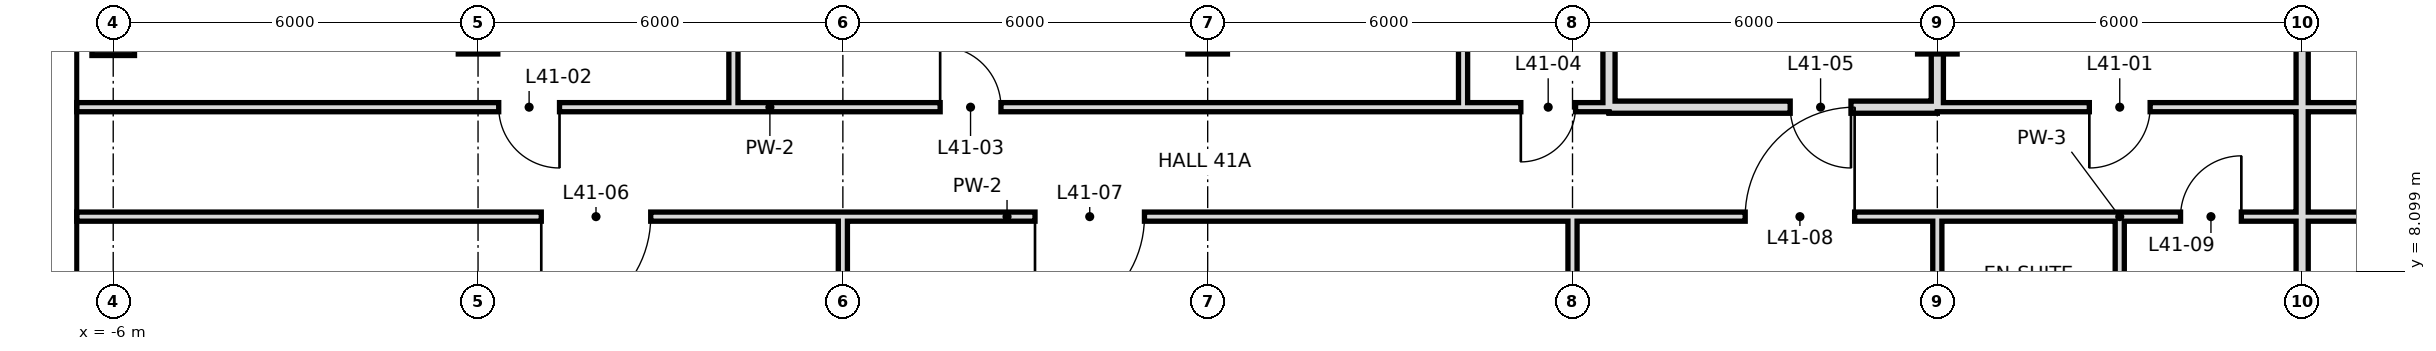
"""IFC4 building model, lengths in metres.
Left out: names, types, materials, properties, quantities, classifications, styles, units other than length and angle.
Written with IfcOpenShell. Run it as: python <this file> out.ifc"""

import sys

from ifc_helpers import new_model, si_unit, direction, frame, frame_2d, origin, origin_2d, place, context, subcontext, project, spatial, rectangle, hollow_rectangle, extrude, element, fill, save


model = new_model("IFC4")
c1 = context("Model", 3, precision=1e-05, world=origin(), true_north=direction((0.0, 1.0)))
c2 = subcontext(c1, "Body", "Model", "MODEL_VIEW")
j1 = project(units=[si_unit("LENGTHUNIT", "METRE"), si_unit("PLANEANGLEUNIT", "RADIAN")], contexts=[c1])
p1 = place(None, origin())
s1 = spatial("IfcSite", under=j1, at=p1, CompositionType="ELEMENT")
p2 = place(p1, origin())
s2 = spatial("IfcBuilding", under=s1, at=p2, CompositionType="ELEMENT")
p3 = place(p2, frame((0.0, 0.0, 178.0)))
s3 = spatial("IfcBuildingStorey", under=s2, at=p3, CompositionType="ELEMENT", Elevation=178.0)
p4 = place(p3, frame((-6.0, 12.0, 0.0), z_axis=(0.0, 0.0, 1.0), x_axis=(1.0, 0.0, 0.0)))
e1 = element("IfcColumn", 1, at=p4, inside=s3, PredefinedType="COLUMN", context=c2, shape_type="SweptSolid", body=[
    extrude(hollow_rectangle(XDim=0.7, YDim=0.7, WallThickness=0.036, at=origin_2d()), origin(), (0.0, 0.0, 1.0), 3.6),
])
for number, where, z_axis, x_axis in (
    (2, (0.0, 12.0, 0.0), (0.0, 0.0, 1.0), (1.0, 0.0, 0.0)),
    (3, (12.0, 12.0, 0.0), (0.0, 0.0, 1.0), (1.0, 0.0, 0.0)),
    (4, (24.0, 12.0, 0.0), (0.0, 0.0, 1.0), (1.0, 0.0, 0.0)),
):
    element("IfcColumn", number, at=place(p3, frame(where, z_axis=z_axis, x_axis=x_axis)), inside=s3, PredefinedType="COLUMN", context=c2, shape_type="SweptSolid", body=[
        extrude(hollow_rectangle(XDim=0.65, YDim=0.65, WallThickness=0.032, at=origin_2d()), origin(), (0.0, 0.0, 1.0), 3.6),
    ])
p5 = place(p3, frame((16.2, 10.8, 0.0), z_axis=(0.0, 0.0, 1.0), x_axis=(0.0, 1.0, 0.0)))
e5 = element("IfcWall", 5, at=p5, inside=s3, PredefinedType="PARTITIONING", context=c2, shape_type="SweptSolid", body=[
    extrude(rectangle(XDim=4.5, YDim=0.15, at=frame_2d((2.25, 0.0))), origin(), (0.0, 0.0, 1.0), 3.42),
])
p6 = place(p3, frame((18.0, -0.6, 0.0), z_axis=(0.0, 0.0, 1.0), x_axis=(0.0, 1.0, 0.0)))
e6 = element("IfcWall", 6, at=p6, inside=s3, PredefinedType="PARTITIONING", context=c2, shape_type="SweptSolid", body=[
    extrude(rectangle(XDim=9.6, YDim=0.15, at=frame_2d((4.8, 0.0))), origin(), (0.0, 0.0, 1.0), 2.72),
])
for number, where, z_axis, x_axis in (
    (7, (18.6, 10.8, 0.0), (0.0, 0.0, 1.0), (0.0, 1.0, 0.0)),
    (8, (24.0, 10.8, 0.0), (0.0, 0.0, 1.0), (0.0, 1.0, 0.0)),
):
    element("IfcWall", number, at=place(p3, frame(where, z_axis=z_axis, x_axis=x_axis)), inside=s3, PredefinedType="SOLIDWALL", context=c2, shape_type="SweptSolid", body=[
        extrude(rectangle(XDim=4.5, YDim=0.2, at=frame_2d((2.25, 0.0))), origin(), (0.0, 0.0, 1.0), 2.72),
    ])
p7 = place(p3, frame((24.0, 6.0, 0.0), z_axis=(0.0, 0.0, 1.0), x_axis=(0.0, 1.0, 0.0)))
e9 = element("IfcWall", 9, at=p7, inside=s3, PredefinedType="PARTITIONING", context=c2, shape_type="SweptSolid", body=[
    extrude(rectangle(XDim=3.0, YDim=0.15, at=frame_2d((1.5, 0.0))), origin(), (0.0, 0.0, 1.0), 2.72),
])
p8 = place(p3, frame((27.0, 6.0, 0.0), z_axis=(0.0, 0.0, 1.0), x_axis=(0.0, 1.0, 0.0)))
e10 = element("IfcWall", 10, at=p8, inside=s3, PredefinedType="PARTITIONING", context=c2, shape_type="SweptSolid", body=[
    extrude(rectangle(XDim=3.0, YDim=0.15, at=frame_2d((1.5, 0.0))), origin(), (0.0, 0.0, 1.0), 3.42),
])
p9 = place(p3, frame((30.0, -0.6, 0.0), z_axis=(0.0, 0.0, 1.0), x_axis=(0.0, 1.0, 0.0)))
e11 = element("IfcWall", 11, at=p9, inside=s3, PredefinedType="SOLIDWALL", context=c2, shape_type="SweptSolid", body=[
    extrude(rectangle(XDim=15.9, YDim=0.2, at=frame_2d((7.95, 0.0))), origin(), (0.0, 0.0, 1.0), 2.72),
])
p10 = place(p3, frame((4.2, 10.8, 0.0), z_axis=(0.0, 0.0, 1.0), x_axis=(0.0, 1.0, 0.0)))
e12 = element("IfcWall", 12, at=p10, inside=s3, PredefinedType="PARTITIONING", context=c2, shape_type="SweptSolid", body=[
    extrude(rectangle(XDim=4.5, YDim=0.15, at=frame_2d((2.25, 0.0))), origin(), (0.0, 0.0, 1.0), 3.42),
])
p11 = place(p3, frame((6.0, -0.6, 0.0), z_axis=(0.0, 0.0, 1.0), x_axis=(0.0, 1.0, 0.0)))
e13 = element("IfcWall", 13, at=p11, inside=s3, PredefinedType="PARTITIONING", context=c2, shape_type="SweptSolid", body=[
    extrude(rectangle(XDim=9.6, YDim=0.15, at=frame_2d((4.8, 0.0))), origin(), (0.0, 0.0, 1.0), 2.72),
])
p12 = place(p3, frame((18.6, 10.8, 0.0), z_axis=(0.0, 0.0, 1.0), x_axis=(1.0, 0.0, 0.0)))
e14 = element("IfcWall", 14, at=p12, inside=s3, PredefinedType="SOLIDWALL", context=c2, shape_type="SweptSolid", body=[
    extrude(rectangle(XDim=5.4, YDim=0.2, at=frame_2d((2.7, 0.0))), origin(), (0.0, 0.0, 1.0), 2.72),
])
p13 = place(p12, frame((2.98, 0.0, 0.0)))
e15 = element("IfcOpeningElement", 15, at=p13, cuts=e14, PredefinedType="OPENING", context=c2, shape_type="SweptSolid", body=[
    extrude(rectangle(XDim=1.0, YDim=2.4, at=frame_2d((0.5, 1.2))), frame((0.0, 0.11, 0.0), z_axis=(0.0, -1.0, 0.0), x_axis=(1.0, 0.0, 0.0)), (0.0, 0.0, 1.0), 0.22),
])
p14 = place(p3, frame((-6.6, 10.8, 0.0), z_axis=(0.0, 0.0, 1.0), x_axis=(1.0, 0.0, 0.0)))
e16 = element("IfcWall", 16, at=p14, inside=s3, PredefinedType="PARTITIONING", context=c2, shape_type="SweptSolid", body=[
    extrude(rectangle(XDim=22.8, YDim=0.15, at=frame_2d((11.4, 0.0))), origin(), (0.0, 0.0, 1.0), 3.42),
])
p15 = place(p14, frame((6.94, 0.0, 0.0)))
e17 = element("IfcOpeningElement", 17, at=p15, cuts=e16, PredefinedType="OPENING", context=c2, shape_type="SweptSolid", body=[
    extrude(rectangle(XDim=1.0, YDim=2.4, at=frame_2d((0.5, 1.2))), frame((0.0, 0.085, 0.0), z_axis=(0.0, -1.0, 0.0), x_axis=(1.0, 0.0, 0.0)), (0.0, 0.0, 1.0), 0.17),
])
p16 = place(p14, frame((14.2, 0.0, 0.0)))
e18 = element("IfcOpeningElement", 18, at=p16, cuts=e16, PredefinedType="OPENING", context=c2, shape_type="SweptSolid", body=[
    extrude(rectangle(XDim=1.0, YDim=2.4, at=frame_2d((0.5, 1.2))), frame((0.0, 0.085, 0.0), z_axis=(0.0, -1.0, 0.0), x_axis=(1.0, 0.0, 0.0)), (0.0, 0.0, 1.0), 0.17),
])
p17 = place(p3, frame((24.0, 10.8, 0.0), z_axis=(0.0, 0.0, 1.0), x_axis=(1.0, 0.0, 0.0)))
e19 = element("IfcWall", 19, at=p17, inside=s3, PredefinedType="PARTITIONING", context=c2, shape_type="SweptSolid", body=[
    extrude(rectangle(XDim=19.8, YDim=0.15, at=frame_2d((9.9, 0.0))), origin(), (0.0, 0.0, 1.0), 3.42),
])
p18 = place(p17, frame((2.5, 0.0, 0.0)))
e20 = element("IfcOpeningElement", 20, at=p18, cuts=e19, PredefinedType="OPENING", context=c2, shape_type="SweptSolid", body=[
    extrude(rectangle(XDim=1.0, YDim=2.4, at=frame_2d((0.5, 1.2))), frame((0.0, 0.085, 0.0), z_axis=(0.0, -1.0, 0.0), x_axis=(1.0, 0.0, 0.0)), (0.0, 0.0, 1.0), 0.17),
])
p19 = place(p17, frame((8.56, 0.0, 0.0)))
e21 = element("IfcOpeningElement", 21, at=p19, cuts=e19, PredefinedType="OPENING", context=c2, shape_type="SweptSolid", body=[
    extrude(rectangle(XDim=1.0, YDim=2.4, at=frame_2d((0.5, 1.2))), frame((0.0, 0.085, 0.0), z_axis=(0.0, -1.0, 0.0), x_axis=(1.0, 0.0, 0.0)), (0.0, 0.0, 1.0), 0.17),
])
p20 = place(p17, frame((16.3, 0.0, 0.0)))
e22 = element("IfcOpeningElement", 22, at=p20, cuts=e19, PredefinedType="OPENING", context=c2, shape_type="SweptSolid", body=[
    extrude(rectangle(XDim=1.0, YDim=2.4, at=frame_2d((0.5, 1.2))), frame((0.0, 0.085, 0.0), z_axis=(0.0, -1.0, 0.0), x_axis=(1.0, 0.0, 0.0)), (0.0, 0.0, 1.0), 0.17),
])
p21 = place(p3, frame((16.2, 10.8, 0.0), z_axis=(0.0, 0.0, 1.0), x_axis=(1.0, 0.0, 0.0)))
e23 = element("IfcWall", 23, at=p21, inside=s3, PredefinedType="PARTITIONING", context=c2, shape_type="SweptSolid", body=[
    extrude(rectangle(XDim=2.4, YDim=0.15, at=frame_2d((1.2, 0.0))), origin(), (0.0, 0.0, 1.0), 3.42),
])
p22 = place(p21, frame((0.95, 0.0, 0.0)))
e24 = element("IfcOpeningElement", 24, at=p22, cuts=e23, PredefinedType="OPENING", context=c2, shape_type="SweptSolid", body=[
    extrude(rectangle(XDim=0.9, YDim=2.4, at=frame_2d((0.45, 1.2))), frame((0.0, 0.085, 0.0), z_axis=(0.0, -1.0, 0.0), x_axis=(1.0, 0.0, 0.0)), (0.0, 0.0, 1.0), 0.17),
])
p23 = place(p3, frame((-6.6, 9.0, 0.0), z_axis=(0.0, 0.0, 1.0), x_axis=(1.0, 0.0, 0.0)))
e25 = element("IfcWall", 25, at=p23, inside=s3, PredefinedType="PARTITIONING", context=c2, shape_type="SweptSolid", body=[
    extrude(rectangle(XDim=30.6, YDim=0.15, at=frame_2d((15.3, 0.0))), origin(), (0.0, 0.0, 1.0), 3.42),
])
p24 = place(p23, frame((7.64, 0.0, 0.0)))
e26 = element("IfcOpeningElement", 26, at=p24, cuts=e25, PredefinedType="OPENING", context=c2, shape_type="SweptSolid", body=[
    extrude(rectangle(XDim=1.8, YDim=2.4, at=frame_2d((0.9, 1.2))), frame((0.0, 0.085, 0.0), z_axis=(0.0, -1.0, 0.0), x_axis=(1.0, 0.0, 0.0)), (0.0, 0.0, 1.0), 0.17),
])
p25 = place(p23, frame((15.76, 0.0, 0.0)))
e27 = element("IfcOpeningElement", 27, at=p25, cuts=e25, PredefinedType="OPENING", context=c2, shape_type="SweptSolid", body=[
    extrude(rectangle(XDim=1.8, YDim=2.4, at=frame_2d((0.9, 1.2))), frame((0.0, 0.085, 0.0), z_axis=(0.0, -1.0, 0.0), x_axis=(1.0, 0.0, 0.0)), (0.0, 0.0, 1.0), 0.17),
])
p26 = place(p23, frame((27.44, 0.0, 0.0)))
e28 = element("IfcOpeningElement", 28, at=p26, cuts=e25, PredefinedType="OPENING", context=c2, shape_type="SweptSolid", body=[
    extrude(rectangle(XDim=1.8, YDim=2.4, at=frame_2d((0.9, 1.2))), frame((0.0, 0.085, 0.0), z_axis=(0.0, -1.0, 0.0), x_axis=(1.0, 0.0, 0.0)), (0.0, 0.0, 1.0), 0.17),
])
p27 = place(p3, frame((27.0, 9.0, 0.0), z_axis=(0.0, 0.0, 1.0), x_axis=(1.0, 0.0, 0.0)))
e29 = element("IfcWall", 29, at=p27, inside=s3, PredefinedType="PARTITIONING", context=c2, shape_type="SweptSolid", body=[
    extrude(rectangle(XDim=15.0, YDim=0.15, at=frame_2d((7.5, 0.0))), origin(), (0.0, 0.0, 1.0), 3.42),
])
p28 = place(p27, frame((1.0, 0.0, 0.0)))
e30 = element("IfcOpeningElement", 30, at=p28, cuts=e29, PredefinedType="OPENING", context=c2, shape_type="SweptSolid", body=[
    extrude(rectangle(XDim=1.0, YDim=2.4, at=frame_2d((0.5, 1.2))), frame((0.0, 0.085, 0.0), z_axis=(0.0, -1.0, 0.0), x_axis=(1.0, 0.0, 0.0)), (0.0, 0.0, 1.0), 0.17),
])
p29 = place(p27, frame((6.16, 0.0, 0.0)))
e31 = element("IfcOpeningElement", 31, at=p29, cuts=e29, PredefinedType="OPENING", context=c2, shape_type="SweptSolid", body=[
    extrude(rectangle(XDim=1.8, YDim=2.4, at=frame_2d((0.9, 1.2))), frame((0.0, 0.085, 0.0), z_axis=(0.0, -1.0, 0.0), x_axis=(1.0, 0.0, 0.0)), (0.0, 0.0, 1.0), 0.17),
])
p30 = place(p3, frame((24.0, 9.0, 0.0), z_axis=(0.0, 0.0, 1.0), x_axis=(1.0, 0.0, 0.0)))
e32 = element("IfcWall", 32, at=p30, inside=s3, PredefinedType="PARTITIONING", context=c2, shape_type="SweptSolid", body=[
    extrude(rectangle(XDim=3.0, YDim=0.15, at=frame_2d((1.5, 0.0))), origin(), (0.0, 0.0, 1.0), 3.42),
])
p31 = place(p18, frame((1.0, 0.0, 0.0), z_axis=(0.0, 0.0, 1.0), x_axis=(-1.0, 0.0, 0.0)))
e33 = element("IfcDoor", 33, at=p31, inside=s3, OperationType="SINGLE_SWING_RIGHT", PredefinedType="DOOR", context=c2, shape_type="SweptSolid", body=[
    extrude(rectangle(XDim=1.0, YDim=2.4, at=frame_2d((0.5, 1.2))), frame((0.0, 0.025, 0.0), z_axis=(0.0, -1.0, 0.0), x_axis=(1.0, 0.0, 0.0)), (0.0, 0.0, 1.0), 0.05),
])
fill(e20, e33)
p32 = place(p15, origin())
e34 = element("IfcDoor", 34, at=p32, inside=s3, OperationType="SINGLE_SWING_RIGHT", PredefinedType="DOOR", context=c2, shape_type="SweptSolid", body=[
    extrude(rectangle(XDim=1.0, YDim=2.4, at=frame_2d((0.5, 1.2))), frame((0.0, 0.025, 0.0), z_axis=(0.0, -1.0, 0.0), x_axis=(1.0, 0.0, 0.0)), (0.0, 0.0, 1.0), 0.05),
])
fill(e17, e34)
p33 = place(p16, origin())
e35 = element("IfcDoor", 35, at=p33, inside=s3, OperationType="SINGLE_SWING_LEFT", PredefinedType="DOOR", context=c2, shape_type="SweptSolid", body=[
    extrude(rectangle(XDim=1.0, YDim=2.4, at=frame_2d((0.5, 1.2))), frame((0.0, 0.025, 0.0), z_axis=(0.0, -1.0, 0.0), x_axis=(1.0, 0.0, 0.0)), (0.0, 0.0, 1.0), 0.05),
])
fill(e18, e35)
p34 = place(p22, frame((0.9, 0.0, 0.0), z_axis=(0.0, 0.0, 1.0), x_axis=(-1.0, 0.0, 0.0)))
e36 = element("IfcDoor", 36, at=p34, inside=s3, OperationType="SINGLE_SWING_RIGHT", PredefinedType="DOOR", context=c2, shape_type="SweptSolid", body=[
    extrude(rectangle(XDim=0.9, YDim=2.4, at=frame_2d((0.45, 1.2))), frame((0.0, 0.025, 0.0), z_axis=(0.0, -1.0, 0.0), x_axis=(1.0, 0.0, 0.0)), (0.0, 0.0, 1.0), 0.05),
])
fill(e24, e36)
p35 = place(p13, origin())
e37 = element("IfcDoor", 37, at=p35, inside=s3, OperationType="SINGLE_SWING_RIGHT", PredefinedType="DOOR", context=c2, shape_type="SweptSolid", body=[
    extrude(rectangle(XDim=1.0, YDim=2.4, at=frame_2d((0.5, 1.2))), frame((0.0, 0.025, 0.0), z_axis=(0.0, -1.0, 0.0), x_axis=(1.0, 0.0, 0.0)), (0.0, 0.0, 1.0), 0.05),
])
fill(e15, e37)
p36 = place(p24, frame((1.8, 0.0, 0.0), z_axis=(0.0, 0.0, 1.0), x_axis=(-1.0, 0.0, 0.0)))
e38 = element("IfcDoor", 38, at=p36, inside=s3, OperationType="SINGLE_SWING_RIGHT", PredefinedType="DOOR", context=c2, shape_type="SweptSolid", body=[
    extrude(rectangle(XDim=1.8, YDim=2.4, at=frame_2d((0.9, 1.2))), frame((0.0, 0.025, 0.0), z_axis=(0.0, -1.0, 0.0), x_axis=(1.0, 0.0, 0.0)), (0.0, 0.0, 1.0), 0.05),
])
fill(e26, e38)
p37 = place(p25, frame((1.8, 0.0, 0.0), z_axis=(0.0, 0.0, 1.0), x_axis=(-1.0, 0.0, 0.0)))
e39 = element("IfcDoor", 39, at=p37, inside=s3, OperationType="SINGLE_SWING_RIGHT", PredefinedType="DOOR", context=c2, shape_type="SweptSolid", body=[
    extrude(rectangle(XDim=1.8, YDim=2.4, at=frame_2d((0.9, 1.2))), frame((0.0, 0.025, 0.0), z_axis=(0.0, -1.0, 0.0), x_axis=(1.0, 0.0, 0.0)), (0.0, 0.0, 1.0), 0.05),
])
fill(e27, e39)
p38 = place(p26, frame((1.8, 0.0, 0.0), z_axis=(0.0, 0.0, 1.0), x_axis=(-1.0, 0.0, 0.0)))
e40 = element("IfcDoor", 40, at=p38, inside=s3, OperationType="SINGLE_SWING_LEFT", PredefinedType="DOOR", context=c2, shape_type="SweptSolid", body=[
    extrude(rectangle(XDim=1.8, YDim=2.4, at=frame_2d((0.9, 1.2))), frame((0.0, 0.025, 0.0), z_axis=(0.0, -1.0, 0.0), x_axis=(1.0, 0.0, 0.0)), (0.0, 0.0, 1.0), 0.05),
])
fill(e28, e40)
p39 = place(p28, frame((1.0, 0.0, 0.0), z_axis=(0.0, 0.0, 1.0), x_axis=(-1.0, 0.0, 0.0)))
e41 = element("IfcDoor", 41, at=p39, inside=s3, OperationType="SINGLE_SWING_LEFT", PredefinedType="DOOR", context=c2, shape_type="SweptSolid", body=[
    extrude(rectangle(XDim=1.0, YDim=2.4, at=frame_2d((0.5, 1.2))), frame((0.0, 0.025, 0.0), z_axis=(0.0, -1.0, 0.0), x_axis=(1.0, 0.0, 0.0)), (0.0, 0.0, 1.0), 0.05),
])
fill(e30, e41)
save(model, sys.argv[1])
